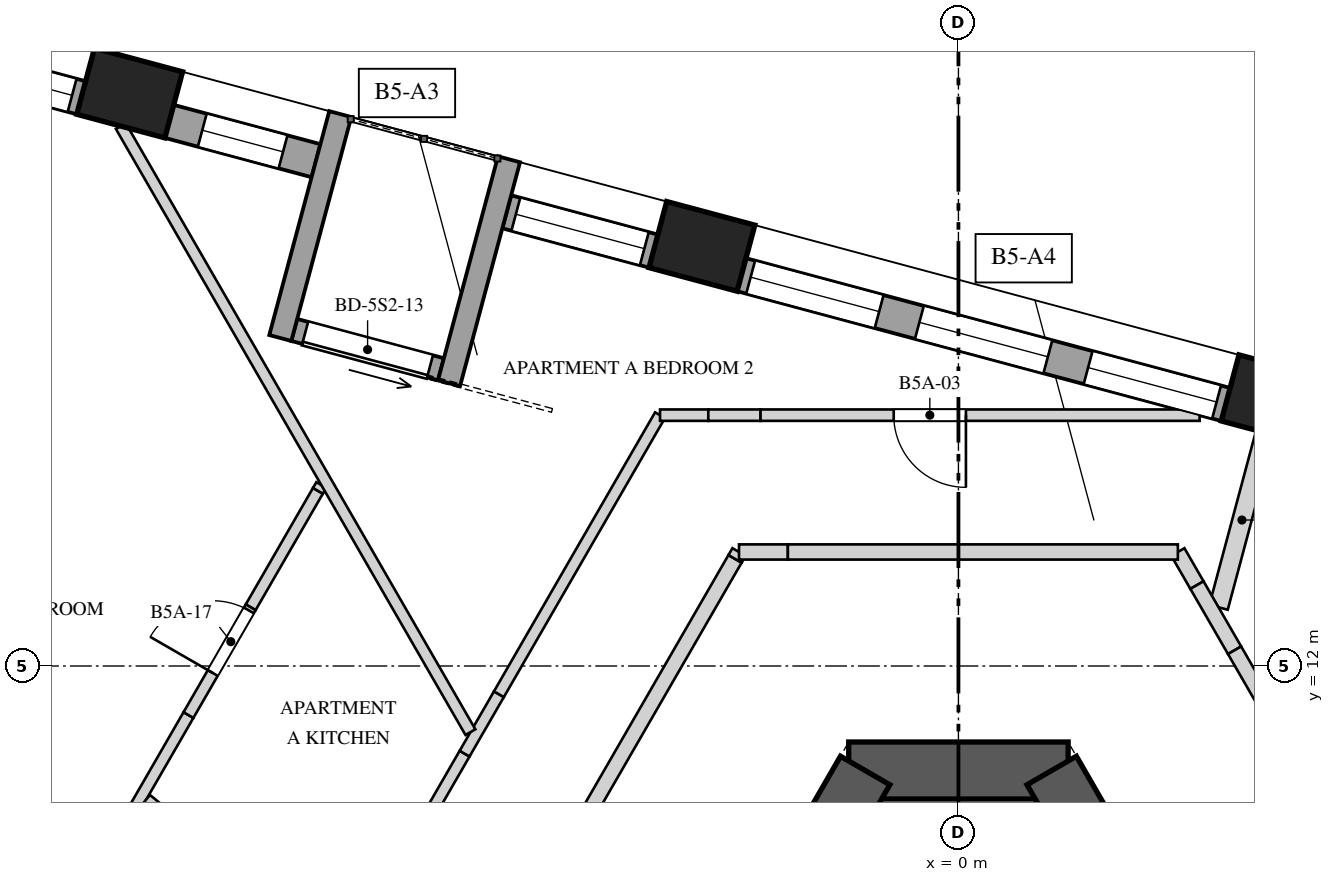
"""IFC4 building model, lengths in metres.
Left out: names, types, materials, properties, quantities, classifications, styles, units other than length and angle.
Written with IfcOpenShell. Run it as: python <this file> out.ifc"""

import sys

from ifc_helpers import new_model, si_unit, direction, frame, frame_2d, origin, origin_2d, place, context, subcontext, project, spatial, polyline, rectangle, outline, extrude, element, fill, save


model = new_model("IFC4")
c1 = context("Model", 3, precision=1e-05, world=origin(), true_north=direction((0.0, 1.0)))
c2 = subcontext(c1, "Body", "Model", "MODEL_VIEW")
j1 = project(units=[si_unit("LENGTHUNIT", "METRE"), si_unit("PLANEANGLEUNIT", "RADIAN")], contexts=[c1])
p1 = place(None, origin())
s1 = spatial("IfcSite", under=j1, at=p1, CompositionType="ELEMENT")
p2 = place(p1, origin())
s2 = spatial("IfcBuilding", under=s1, at=p2, CompositionType="ELEMENT")
p3 = place(p2, frame((0.0, 0.0, 200.0)))
s3 = spatial("IfcBuildingStorey", under=s2, at=p3, CompositionType="ELEMENT", Elevation=200.0)
p4 = place(p3, frame((1.443, 10.625, 0.0), z_axis=(0.0, 0.0, 1.0), x_axis=(-1.0, 0.0, 0.0)))
e1 = element("IfcWall", 1, at=p4, inside=s3, PredefinedType="SHEAR", context=c2, shape_type="SweptSolid", body=[
    extrude(rectangle(XDim=2.887, YDim=0.75, at=frame_2d((1.443, 0.0))), origin(), (0.0, 0.0, 1.0), 4.0),
])
p5 = place(p3, frame((-1.227, 10.625, 0.0), z_axis=(0.0, 0.0, 1.0), x_axis=(-0.500002161919, -0.866024155596, 0.0)))
e2 = element("IfcWall", 2, at=p5, inside=s3, PredefinedType="SHEAR", context=c2, shape_type="SweptSolid", body=[
    extrude(rectangle(XDim=17.176, YDim=0.75, at=frame_2d((8.588, 0.0))), origin(), (0.0, 0.0, 1.0), 4.0),
])
p6 = place(p5, frame((6.793, 0.0, 0.0)))
e3 = element("IfcOpeningElement", 3, at=p6, cuts=e2, PredefinedType="OPENING", context=c2, shape_type="SweptSolid", body=[
    extrude(rectangle(XDim=1.0, YDim=2.4, at=frame_2d((0.5, 1.2))), frame((0.0, 0.385, 0.0), z_axis=(0.0, -1.0, 0.0), x_axis=(1.0, 0.0, 0.0)), (0.0, 0.0, 1.0), 0.77),
])
p7 = place(p5, frame((14.864, 0.0, 0.0)))
e4 = element("IfcOpeningElement", 4, at=p7, cuts=e2, PredefinedType="OPENING", context=c2, shape_type="SweptSolid", body=[
    extrude(rectangle(XDim=0.8, YDim=2.1, at=frame_2d((0.4, 1.05))), frame((0.0, 0.385, 0.0), z_axis=(0.0, -1.0, 0.0), x_axis=(1.0, 0.0, 0.0)), (0.0, 0.0, 1.0), 0.77),
])
p8 = place(p3, frame((9.815, -4.25, 0.0), z_axis=(0.0, 0.0, 1.0), x_axis=(-0.500002161919, 0.866024155596, 0.0)))
e5 = element("IfcWall", 5, at=p8, inside=s3, PredefinedType="SHEAR", context=c2, shape_type="SweptSolid", body=[
    extrude(rectangle(XDim=17.176, YDim=0.75, at=frame_2d((8.588, 0.0))), origin(), (0.0, 0.0, 1.0), 4.0),
])
p9 = place(p8, frame((6.863, 0.0, 0.0)))
e6 = element("IfcOpeningElement", 6, at=p9, cuts=e5, PredefinedType="OPENING", context=c2, shape_type="SweptSolid", body=[
    extrude(rectangle(XDim=1.0, YDim=2.4, at=frame_2d((0.5, 1.2))), frame((0.0, 0.385, 0.0), z_axis=(0.0, -1.0, 0.0), x_axis=(1.0, 0.0, 0.0)), (0.0, 0.0, 1.0), 0.77),
])
for number, where, z_axis, x_axis in (
    (7, (4.154, 15.503, -0.35), (0.0, 0.0, 1.0), (-0.966, 0.259, 0.0)),
    (8, (-3.375, 17.521, -0.35), (0.0, 0.0, 1.0), (-0.966, 0.259, 0.0)),
    (9, (-10.903, 19.538, -0.35), (0.0, 0.0, 1.0), (-0.966, 0.259, 0.0)),
):
    element("IfcColumn", number, at=place(p3, frame(where, z_axis=z_axis, x_axis=x_axis)), inside=s3, PredefinedType="COLUMN", context=c2, shape_type="SweptSolid", body=[
        extrude(rectangle(XDim=1.2, YDim=0.9, at=origin_2d()), origin(), (0.0, 0.0, 1.0), 4.35),
    ])
p10 = place(p3, frame((3.516, 15.441, 0.0), z_axis=(0.0, 0.0, 1.0), x_axis=(-0.965933178973, 0.258791602952, 0.0)))
e10 = element("IfcWall", 10, at=p10, inside=s3, PredefinedType="SOLIDWALL", context=c2, shape_type="SweptSolid", body=[
    extrude(rectangle(XDim=6.594, YDim=0.45, at=frame_2d((3.297, 0.0))), origin(), (0.0, 0.0, 1.0), 3.3),
])
p11 = place(p10, frame((0.124, 0.0, 0.5)))
e11 = element("IfcOpeningElement", 11, at=p11, cuts=e10, PredefinedType="OPENING", context=c2, shape_type="SweptSolid", body=[
    extrude(rectangle(XDim=1.75, YDim=2.65, at=frame_2d((0.875, 1.325))), frame((0.0, 0.235, 0.0), z_axis=(0.0, -1.0, 0.0), x_axis=(1.0, 0.0, 0.0)), (0.0, 0.0, 1.0), 0.47),
])
p12 = place(p10, frame((2.422, 0.0, 0.5)))
e12 = element("IfcOpeningElement", 12, at=p12, cuts=e10, PredefinedType="OPENING", context=c2, shape_type="SweptSolid", body=[
    extrude(rectangle(XDim=1.75, YDim=2.65, at=frame_2d((0.875, 1.325))), frame((0.0, 0.235, 0.0), z_axis=(0.0, -1.0, 0.0), x_axis=(1.0, 0.0, 0.0)), (0.0, 0.0, 1.0), 0.47),
])
p13 = place(p10, frame((4.72, 0.0, 0.5)))
e13 = element("IfcOpeningElement", 13, at=p13, cuts=e10, PredefinedType="OPENING", context=c2, shape_type="SweptSolid", body=[
    extrude(rectangle(XDim=1.75, YDim=2.65, at=frame_2d((0.875, 1.325))), frame((0.0, 0.235, 0.0), z_axis=(0.0, -1.0, 0.0), x_axis=(1.0, 0.0, 0.0)), (0.0, 0.0, 1.0), 0.47),
])
p14 = place(p3, frame((-4.012, 17.458, 0.0), z_axis=(0.0, 0.0, 1.0), x_axis=(-0.965899500874, 0.25891727291, 0.0)))
e14 = element("IfcWall", 14, at=p14, inside=s3, PredefinedType="SOLIDWALL", context=c2, shape_type="SweptSolid", body=[
    extrude(rectangle(XDim=1.998, YDim=0.45, at=frame_2d((0.999, 0.0))), origin(), (0.0, 0.0, 1.0), 3.3),
])
p15 = place(p14, frame((0.124, 0.0, 0.5)))
e15 = element("IfcOpeningElement", 15, at=p15, cuts=e14, PredefinedType="OPENING", context=c2, shape_type="SweptSolid", body=[
    extrude(rectangle(XDim=1.75, YDim=2.65, at=frame_2d((0.875, 1.325))), frame((0.0, 0.235, 0.0), z_axis=(0.0, -1.0, 0.0), x_axis=(1.0, 0.0, 0.0)), (0.0, 0.0, 1.0), 0.47),
])
p16 = place(p3, frame((-8.452, 18.648, 0.0), z_axis=(0.0, 0.0, 1.0), x_axis=(-0.96593005298, 0.258803270362, 0.0)))
e16 = element("IfcWall", 16, at=p16, inside=s3, PredefinedType="SOLIDWALL", context=c2, shape_type="SweptSolid", body=[
    extrude(rectangle(XDim=1.998, YDim=0.45, at=frame_2d((0.999, 0.0))), origin(), (0.0, 0.0, 1.0), 3.3),
])
p17 = place(p16, frame((0.449, 0.0, 0.5)))
e17 = element("IfcOpeningElement", 17, at=p17, cuts=e16, PredefinedType="OPENING", context=c2, shape_type="SweptSolid", body=[
    extrude(rectangle(XDim=1.1, YDim=2.65, at=frame_2d((0.55, 1.325))), frame((0.0, 0.235, 0.0), z_axis=(0.0, -1.0, 0.0), x_axis=(1.0, 0.0, 0.0)), (0.0, 0.0, 1.0), 0.47),
])
p18 = place(p3, frame((-11.541, 19.476, 0.0), z_axis=(0.0, 0.0, 1.0), x_axis=(-0.965922598948, 0.258831089404, 0.0)))
e18 = element("IfcWall", 18, at=p18, inside=s3, PredefinedType="SOLIDWALL", context=c2, shape_type="SweptSolid", body=[
    extrude(rectangle(XDim=5.994, YDim=0.45, at=frame_2d((2.997, 0.0))), origin(), (0.0, 0.0, 1.0), 3.3),
])
p19 = place(p18, frame((0.124, 0.0, 0.5)))
e19 = element("IfcOpeningElement", 19, at=p19, cuts=e18, PredefinedType="OPENING", context=c2, shape_type="SweptSolid", body=[
    extrude(rectangle(XDim=1.75, YDim=2.65, at=frame_2d((0.875, 1.325))), frame((0.0, 0.235, 0.0), z_axis=(0.0, -1.0, 0.0), x_axis=(1.0, 0.0, 0.0)), (0.0, 0.0, 1.0), 0.47),
])
p20 = place(p18, frame((2.422, 0.0, 0.5)))
e20 = element("IfcOpeningElement", 20, at=p20, cuts=e18, PredefinedType="OPENING", context=c2, shape_type="SweptSolid", body=[
    extrude(rectangle(XDim=1.75, YDim=2.65, at=frame_2d((0.875, 1.325))), frame((0.0, 0.235, 0.0), z_axis=(0.0, -1.0, 0.0), x_axis=(1.0, 0.0, 0.0)), (0.0, 0.0, 1.0), 0.47),
])
p21 = place(p18, frame((4.745, 0.0, 0.5)))
e21 = element("IfcOpeningElement", 21, at=p21, cuts=e18, PredefinedType="OPENING", context=c2, shape_type="SweptSolid", body=[
    extrude(rectangle(XDim=1.1, YDim=2.0, at=frame_2d((0.55, 1.0))), frame((0.0, 0.235, 0.0), z_axis=(0.0, -1.0, 0.0), x_axis=(1.0, 0.0, 0.0)), (0.0, 0.0, 1.0), 0.47),
])
p22 = place(p3, frame((-6.808, 15.904, 0.0), z_axis=(0.0, 0.0, 1.0), x_axis=(-0.96593005298, 0.258803270362, 0.0)))
e22 = element("IfcWall", 22, at=p22, inside=s3, PredefinedType="SOLIDWALL", context=c2, shape_type="SweptSolid", body=[
    extrude(rectangle(XDim=1.998, YDim=0.3, at=frame_2d((0.999, 0.0))), origin(), (0.0, 0.0, 1.0), 3.3),
])
p23 = place(p22, frame((0.149, 0.0, 0.0)))
e23 = element("IfcOpeningElement", 23, at=p23, cuts=e22, PredefinedType="OPENING", context=c2, shape_type="SweptSolid", body=[
    extrude(rectangle(XDim=1.7, YDim=2.45, at=frame_2d((0.85, 1.225))), frame((0.0, 0.16, 0.0), z_axis=(0.0, -1.0, 0.0), x_axis=(1.0, 0.0, 0.0)), (0.0, 0.0, 1.0), 0.32),
])
p24 = place(p3, frame((-5.913, 18.666, 0.0), z_axis=(0.0, 0.0, 1.0), x_axis=(-0.258793435045, -0.965932688119, 0.0)))
e24 = element("IfcWall", 24, at=p24, inside=s3, PredefinedType="SOLIDWALL", context=c2, shape_type="SweptSolid", body=[
    extrude(rectangle(XDim=3.05, YDim=0.3, at=frame_2d((1.525, 0.0))), origin(), (0.0, 0.0, 1.0), 3.3),
])
p25 = place(p3, frame((-8.132, 19.261, 0.0), z_axis=(0.0, 0.0, 1.0), x_axis=(-0.25877342651, -0.9659380486, 0.0)))
e25 = element("IfcWall", 25, at=p25, inside=s3, PredefinedType="SOLIDWALL", context=c2, shape_type="SweptSolid", body=[
    extrude(rectangle(XDim=3.05, YDim=0.3, at=frame_2d((1.525, 0.0))), origin(), (0.0, 0.0, 1.0), 3.3),
])
p26 = place(p3, frame((-6.965, 10.037, 0.0), z_axis=(0.0, 0.0, 1.0), x_axis=(0.499955859829, 0.866050886624, 0.0)))
e26 = element("IfcWall", 26, at=p26, inside=s3, PredefinedType="PARTITIONING", context=c2, shape_type="SweptSolid", body=[
    extrude(rectangle(XDim=0.936, YDim=0.15, at=frame_2d((0.468, 0.0))), origin(), (0.0, 0.0, 1.0), 3.65),
])
p27 = place(p3, frame((-6.497, 10.847, 0.0), z_axis=(0.0, 0.0, 1.0), x_axis=(0.500065807255, 0.865987406614, 0.0)))
e27 = element("IfcWall", 27, at=p27, inside=s3, PredefinedType="PARTITIONING", context=c2, shape_type="SweptSolid", body=[
    extrude(rectangle(XDim=0.903, YDim=0.15, at=frame_2d((0.451, 0.0))), origin(), (0.0, 0.0, 1.0), 2.75),
])
p28 = place(p3, frame((-6.046, 11.629, 0.0), z_axis=(0.0, 0.0, 1.0), x_axis=(0.499991648869, 0.866030225258, 0.0)))
e28 = element("IfcWall", 28, at=p28, inside=s3, PredefinedType="PARTITIONING", context=c2, shape_type="SweptSolid", body=[
    extrude(rectangle(XDim=4.239, YDim=0.15, at=frame_2d((2.12, 0.0))), origin(), (0.0, 0.0, 1.0), 3.65),
])
p29 = place(p3, frame((-11.006, 9.836, 0.0), z_axis=(0.0, 0.0, 1.0), x_axis=(0.500047902311, 0.865997745606, 0.0)))
e29 = element("IfcWall", 29, at=p29, inside=s3, PredefinedType="PARTITIONING", context=c2, shape_type="SweptSolid", body=[
    extrude(rectangle(XDim=1.753, YDim=0.15, at=frame_2d((0.876, 0.0))), origin(), (0.0, 0.0, 1.0), 3.65),
])
p30 = place(p3, frame((-10.13, 11.355, 0.0), z_axis=(0.0, 0.0, 1.0), x_axis=(0.49996740399, 0.866044222282, 0.0)))
e30 = element("IfcWall", 30, at=p30, inside=s3, PredefinedType="PARTITIONING", context=c2, shape_type="SweptSolid", body=[
    extrude(outline(polyline([(0.0, 0.0), (1.639, 0.0), (1.639, 3.65), (0.931, 3.65), (0.931, 2.55), (0.0, 2.55), (0.0, 0.0)])), frame((0.0, 0.075, 0.0), z_axis=(0.0, -1.0, 0.0), x_axis=(1.0, 0.0, 0.0)), (0.0, 0.0, 1.0), 0.15),
])
p31 = place(p30, frame((0.639, 0.0, 0.0)))
e31 = element("IfcOpeningElement", 31, at=p31, cuts=e30, PredefinedType="OPENING", context=c2, shape_type="SweptSolid", body=[
    extrude(rectangle(XDim=0.95, YDim=2.4, at=frame_2d((0.475, 1.2))), frame((0.0, 0.085, 0.0), z_axis=(0.0, -1.0, 0.0), x_axis=(1.0, 0.0, 0.0)), (0.0, 0.0, 1.0), 0.17),
])
p32 = place(p3, frame((-9.31, 12.774, 0.0), z_axis=(0.0, 0.0, 1.0), x_axis=(0.50001746176, 0.866015321998, 0.0)))
e32 = element("IfcWall", 32, at=p32, inside=s3, PredefinedType="PARTITIONING", context=c2, shape_type="SweptSolid", body=[
    extrude(rectangle(XDim=1.767, YDim=0.15, at=frame_2d((0.884, 0.0))), origin(), (0.0, 0.0, 1.0), 3.65),
])
p33 = place(p3, frame((-8.427, 14.305, 0.0), z_axis=(0.0, 0.0, 1.0), x_axis=(0.498523158552, 0.86687638126, 0.0)))
e33 = element("IfcWall", 33, at=p33, inside=s3, PredefinedType="PARTITIONING", context=c2, shape_type="SweptSolid", body=[
    extrude(rectangle(XDim=0.088, YDim=0.15, at=frame_2d((0.044, 0.0))), origin(), (0.0, 0.0, 1.0), 2.75),
])
p34 = place(p3, frame((-11.02, 19.103, 0.0), z_axis=(0.0, 0.0, 1.0), x_axis=(0.499688011829, -0.866205455325, 0.0)))
e34 = element("IfcWall", 34, at=p34, inside=s3, PredefinedType="PARTITIONING", context=c2, shape_type="SweptSolid", body=[
    extrude(rectangle(XDim=9.205, YDim=0.15, at=frame_2d((4.603, 0.0))), origin(), (0.0, 0.0, 1.0), 2.75),
])
p35 = place(p3, frame((-9.637, 5.559, 0.0), z_axis=(0.0, 0.0, 1.0), x_axis=(-0.866210875497, 0.499678615883, 0.0)))
e35 = element("IfcWall", 35, at=p35, inside=s3, PredefinedType="PARTITIONING", context=c2, shape_type="SweptSolid", body=[
    extrude(rectangle(XDim=10.928, YDim=0.15, at=frame_2d((5.464, 0.0))), origin(), (0.0, 0.0, 1.0), 2.75),
])
p36 = place(p3, frame((-8.136, 8.157, 0.0), z_axis=(0.0, 0.0, 1.0), x_axis=(-0.773342654389, 0.633988279784, 0.0)))
e36 = element("IfcWall", 36, at=p36, inside=s3, PredefinedType="PARTITIONING", context=c2, shape_type="SweptSolid", body=[
    extrude(rectangle(XDim=3.294, YDim=0.15, at=frame_2d((1.647, 0.0))), origin(), (0.0, 0.0, 1.0), 3.65),
])
p37 = place(p3, frame((-3.926, 15.3, 0.0), z_axis=(0.0, 0.0, 1.0), x_axis=(1.0, 0.0, 0.0)))
e37 = element("IfcWall", 37, at=p37, inside=s3, PredefinedType="PARTITIONING", context=c2, shape_type="SweptSolid", body=[
    extrude(rectangle(XDim=0.635, YDim=0.15, at=frame_2d((0.318, 0.0))), origin(), (0.0, 0.0, 1.0), 3.65),
])
p38 = place(p3, frame((-3.291, 15.3, 0.0), z_axis=(0.0, 0.0, 1.0), x_axis=(1.0, 0.0, 0.0)))
e38 = element("IfcWall", 38, at=p38, inside=s3, PredefinedType="PARTITIONING", context=c2, shape_type="SweptSolid", body=[
    extrude(rectangle(XDim=0.687, YDim=0.15, at=frame_2d((0.344, 0.0))), origin(), (0.0, 0.0, 1.0), 2.95),
])
p39 = place(p3, frame((3.173, 15.3, 0.0), z_axis=(0.0, 0.0, 1.0), x_axis=(-1.0, 0.0, 0.0)))
e39 = element("IfcWall", 39, at=p39, inside=s3, PredefinedType="PARTITIONING", context=c2, shape_type="SweptSolid", body=[
    extrude(rectangle(XDim=5.777, YDim=0.15, at=frame_2d((2.888, 0.0))), origin(), (0.0, 0.0, 1.0), 3.65),
])
p40 = place(p39, frame((3.075, 0.0, 0.0)))
e40 = element("IfcOpeningElement", 40, at=p40, cuts=e39, PredefinedType="OPENING", context=c2, shape_type="SweptSolid", body=[
    extrude(rectangle(XDim=0.95, YDim=2.4, at=frame_2d((0.475, 1.2))), frame((0.0, 0.085, 0.0), z_axis=(0.0, -1.0, 0.0), x_axis=(1.0, 0.0, 0.0)), (0.0, 0.0, 1.0), 0.17),
])
p41 = place(p3, frame((4.038, 15.068, 0.0), z_axis=(0.0, 0.0, 1.0), x_axis=(-0.258838766998, -0.965920541607, 0.0)))
e41 = element("IfcWall", 41, at=p41, inside=s3, PredefinedType="SOLIDWALL", context=c2, shape_type="SweptSolid", body=[
    extrude(rectangle(XDim=2.377, YDim=0.25, at=frame_2d((1.188, 0.0))), origin(), (0.0, 0.0, 1.0), 2.95),
])
p42 = place(p3, frame((2.887, 13.5, 0.0), z_axis=(0.0, 0.0, 1.0), x_axis=(0.500002592159, -0.866023907196, 0.0)))
e42 = element("IfcWall", 42, at=p42, inside=s3, PredefinedType="SOLIDWALL", context=c2, shape_type="SweptSolid", body=[
    extrude(rectangle(XDim=0.503, YDim=0.2, at=frame_2d((0.251, 0.0))), origin(), (0.0, 0.0, 1.0), 3.65),
])
p43 = place(p3, frame((3.138, 13.064, 0.0), z_axis=(0.0, 0.0, 1.0), x_axis=(0.500063959222, -0.865988473761, 0.0)))
e43 = element("IfcWall", 43, at=p43, inside=s3, PredefinedType="SOLIDWALL", context=c2, shape_type="SweptSolid", body=[
    extrude(rectangle(XDim=0.99, YDim=0.2, at=frame_2d((0.495, 0.0))), origin(), (0.0, 0.0, 1.0), 2.95),
])
p44 = place(p3, frame((3.633, 12.207, 0.0), z_axis=(0.0, 0.0, 1.0), x_axis=(0.499990271856, -0.866031020258, 0.0)))
e44 = element("IfcWall", 44, at=p44, inside=s3, PredefinedType="SOLIDWALL", context=c2, shape_type="SweptSolid", body=[
    extrude(rectangle(XDim=5.182, YDim=0.2, at=frame_2d((2.591, 0.0))), origin(), (0.0, 0.0, 1.0), 3.65),
])
p45 = place(p3, frame((-5.017, 9.811, 0.0), z_axis=(0.0, 0.0, 1.0), x_axis=(0.499993700073, 0.866029041019, 0.0)))
e45 = element("IfcWall", 45, at=p45, inside=s3, PredefinedType="SOLIDWALL", context=c2, shape_type="SweptSolid", body=[
    extrude(rectangle(XDim=4.155, YDim=0.2, at=frame_2d((2.078, 0.0))), origin(), (0.0, 0.0, 1.0), 3.65),
])
p46 = place(p3, frame((-2.939, 13.409, 0.0), z_axis=(0.0, 0.0, 1.0), x_axis=(0.500393920955, 0.865797853931, 0.0)))
e46 = element("IfcWall", 46, at=p46, inside=s3, PredefinedType="SOLIDWALL", context=c2, shape_type="SweptSolid", body=[
    extrude(rectangle(XDim=0.105, YDim=0.2, at=frame_2d((0.052, 0.0))), origin(), (0.0, 0.0, 1.0), 2.95),
])
p47 = place(p3, frame((-2.887, 13.5, 0.0), z_axis=(0.0, 0.0, 1.0), x_axis=(1.0, 0.0, 0.0)))
e47 = element("IfcWall", 47, at=p47, inside=s3, PredefinedType="SOLIDWALL", context=c2, shape_type="SweptSolid", body=[
    extrude(rectangle(XDim=0.643, YDim=0.2, at=frame_2d((0.321, 0.0))), origin(), (0.0, 0.0, 1.0), 2.95),
])
p48 = place(p3, frame((-2.244, 13.5, 0.0), z_axis=(0.0, 0.0, 1.0), x_axis=(1.0, 0.0, 0.0)))
e48 = element("IfcWall", 48, at=p48, inside=s3, PredefinedType="SOLIDWALL", context=c2, shape_type="SweptSolid", body=[
    extrude(rectangle(XDim=5.131, YDim=0.2, at=frame_2d((2.565, 0.0))), origin(), (0.0, 0.0, 1.0), 3.65),
])
p49 = place(p11, origin())
e49 = element("IfcWindow", 49, at=p49, inside=s3, PartitioningType="SINGLE_PANEL", PredefinedType="WINDOW", context=c2, shape_type="SweptSolid", body=[
    extrude(rectangle(XDim=1.75, YDim=2.65, at=frame_2d((0.875, 1.325))), frame((0.0, 0.03, 0.0), z_axis=(0.0, -1.0, 0.0), x_axis=(1.0, 0.0, 0.0)), (0.0, 0.0, 1.0), 0.06),
])
fill(e11, e49)
p50 = place(p12, origin())
e50 = element("IfcWindow", 50, at=p50, inside=s3, PartitioningType="SINGLE_PANEL", PredefinedType="WINDOW", context=c2, shape_type="SweptSolid", body=[
    extrude(rectangle(XDim=1.75, YDim=2.65, at=frame_2d((0.875, 1.325))), frame((0.0, 0.03, 0.0), z_axis=(0.0, -1.0, 0.0), x_axis=(1.0, 0.0, 0.0)), (0.0, 0.0, 1.0), 0.06),
])
fill(e12, e50)
p51 = place(p13, origin())
e51 = element("IfcWindow", 51, at=p51, inside=s3, PartitioningType="SINGLE_PANEL", PredefinedType="WINDOW", context=c2, shape_type="SweptSolid", body=[
    extrude(rectangle(XDim=1.75, YDim=2.65, at=frame_2d((0.875, 1.325))), frame((0.0, 0.03, 0.0), z_axis=(0.0, -1.0, 0.0), x_axis=(1.0, 0.0, 0.0)), (0.0, 0.0, 1.0), 0.06),
])
fill(e13, e51)
p52 = place(p15, origin())
e52 = element("IfcWindow", 52, at=p52, inside=s3, PartitioningType="SINGLE_PANEL", PredefinedType="WINDOW", context=c2, shape_type="SweptSolid", body=[
    extrude(rectangle(XDim=1.75, YDim=2.65, at=frame_2d((0.875, 1.325))), frame((0.0, 0.03, 0.0), z_axis=(0.0, -1.0, 0.0), x_axis=(1.0, 0.0, 0.0)), (0.0, 0.0, 1.0), 0.06),
])
fill(e15, e52)
p53 = place(p17, origin())
e53 = element("IfcWindow", 53, at=p53, inside=s3, PartitioningType="SINGLE_PANEL", PredefinedType="WINDOW", context=c2, shape_type="SweptSolid", body=[
    extrude(rectangle(XDim=1.1, YDim=2.65, at=frame_2d((0.55, 1.325))), frame((0.0, 0.03, 0.0), z_axis=(0.0, -1.0, 0.0), x_axis=(1.0, 0.0, 0.0)), (0.0, 0.0, 1.0), 0.06),
])
fill(e17, e53)
p54 = place(p19, origin())
e54 = element("IfcWindow", 54, at=p54, inside=s3, PartitioningType="SINGLE_PANEL", PredefinedType="WINDOW", context=c2, shape_type="SweptSolid", body=[
    extrude(rectangle(XDim=1.75, YDim=2.65, at=frame_2d((0.875, 1.325))), frame((0.0, 0.03, 0.0), z_axis=(0.0, -1.0, 0.0), x_axis=(1.0, 0.0, 0.0)), (0.0, 0.0, 1.0), 0.06),
])
fill(e19, e54)
p55 = place(p23, origin())
e55 = element("IfcDoor", 55, at=p55, inside=s3, OperationType="SLIDING_TO_LEFT", PredefinedType="DOOR", context=c2, shape_type="SweptSolid", body=[
    extrude(rectangle(XDim=1.7, YDim=2.45, at=frame_2d((0.85, 1.225))), frame((0.0, 0.025, 0.0), z_axis=(0.0, -1.0, 0.0), x_axis=(1.0, 0.0, 0.0)), (0.0, 0.0, 1.0), 0.05),
])
fill(e23, e55)
p56 = place(p40, origin())
e56 = element("IfcDoor", 56, at=p56, inside=s3, OperationType="SINGLE_SWING_LEFT", PredefinedType="DOOR", context=c2, shape_type="SweptSolid", body=[
    extrude(rectangle(XDim=0.95, YDim=2.4, at=frame_2d((0.475, 1.2))), frame((0.0, 0.025, 0.0), z_axis=(0.0, -1.0, 0.0), x_axis=(1.0, 0.0, 0.0)), (0.0, 0.0, 1.0), 0.05),
])
fill(e40, e56)
p57 = place(p31, origin())
e57 = element("IfcDoor", 57, at=p57, inside=s3, OperationType="SINGLE_SWING_LEFT", PredefinedType="DOOR", context=c2, shape_type="SweptSolid", body=[
    extrude(rectangle(XDim=0.95, YDim=2.4, at=frame_2d((0.475, 1.2))), frame((0.0, 0.025, 0.0), z_axis=(0.0, -1.0, 0.0), x_axis=(1.0, 0.0, 0.0)), (0.0, 0.0, 1.0), 0.05),
])
fill(e31, e57)
save(model, sys.argv[1])
